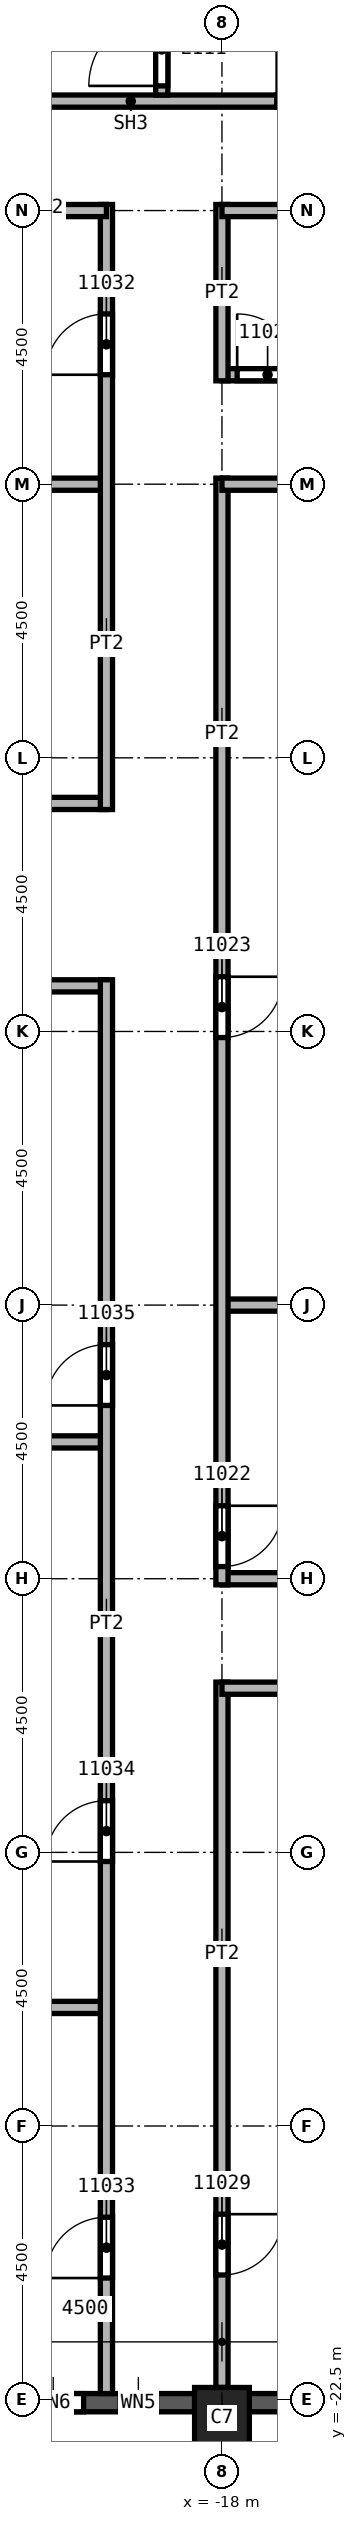
"""IFC4 building model, lengths in metres.
Left out: names, types, materials, properties, quantities, classifications, styles, units other than length and angle.
Written with IfcOpenShell. Run it as: python <this file> out.ifc"""

import sys

from ifc_helpers import new_model, si_unit, direction, frame, frame_2d, origin, origin_2d, place, context, subcontext, project, spatial, rectangle, extrude, element, fill, save


model = new_model("IFC4")
c1 = context("Model", 3, precision=1e-05, world=origin(), true_north=direction((0.0, 1.0)))
c2 = subcontext(c1, "Body", "Model", "MODEL_VIEW")
j1 = project(units=[si_unit("LENGTHUNIT", "METRE"), si_unit("PLANEANGLEUNIT", "RADIAN")], contexts=[c1])
p1 = place(None, origin())
s1 = spatial("IfcSite", under=j1, at=p1, CompositionType="ELEMENT")
p2 = place(p1, origin())
s2 = spatial("IfcBuilding", under=s1, at=p2, CompositionType="ELEMENT")
p3 = place(p2, frame((0.0, 0.0, 188.0)))
s3 = spatial("IfcBuildingStorey", under=s2, at=p3, CompositionType="ELEMENT", Elevation=188.0)
p4 = place(p3, frame((-18.0, -22.8, 0.0), z_axis=(0.0, 0.0, 1.0), x_axis=(1.0, 0.0, 0.0)))
e1 = element("IfcColumn", 1, at=p4, inside=s3, PredefinedType="COLUMN", context=c2, shape_type="SweptSolid", body=[
    extrude(rectangle(XDim=0.9, YDim=1.0, at=origin_2d()), origin(), (0.0, 0.0, 1.0), 3.72),
])
p5 = place(p3, frame((-22.05, -22.55, 0.0), z_axis=(0.0, 0.0, 1.0), x_axis=(1.0, 0.0, 0.0)))
e2 = element("IfcWall", 2, at=p5, inside=s3, PredefinedType="SOLIDWALL", context=c2, shape_type="SweptSolid", body=[
    extrude(rectangle(XDim=3.6, YDim=0.3, at=frame_2d((1.8, 0.0))), origin(), (0.0, 0.0, 1.0), 3.12),
])
p6 = place(p5, frame((0.775, 0.0, 0.8)))
e3 = element("IfcOpeningElement", 3, at=p6, cuts=e2, PredefinedType="OPENING", context=c2, shape_type="SweptSolid", body=[
    extrude(rectangle(XDim=1.0, YDim=1.95, at=frame_2d((0.5, 0.975))), frame((0.0, 0.15, 0.0), z_axis=(0.0, -1.0, 0.0), x_axis=(1.0, 0.0, 0.0)), (0.0, 0.0, 1.0), 0.3),
])
p7 = place(p5, frame((2.375, 0.0, 0.8)))
e4 = element("IfcOpeningElement", 4, at=p7, cuts=e2, PredefinedType="OPENING", context=c2, shape_type="SweptSolid", body=[
    extrude(rectangle(XDim=0.6, YDim=1.95, at=frame_2d((0.3, 0.975))), frame((0.0, 0.15, 0.0), z_axis=(0.0, -1.0, 0.0), x_axis=(1.0, 0.0, 0.0)), (0.0, 0.0, 1.0), 0.3),
])
p8 = place(p3, frame((-17.55, -22.55, 0.0), z_axis=(0.0, 0.0, 1.0), x_axis=(1.0, 0.0, 0.0)))
e5 = element("IfcWall", 5, at=p8, inside=s3, PredefinedType="SOLIDWALL", context=c2, shape_type="SweptSolid", body=[
    extrude(rectangle(XDim=3.6, YDim=0.3, at=frame_2d((1.8, 0.0))), origin(), (0.0, 0.0, 1.0), 3.12),
])
p9 = place(p8, frame((0.6, 0.0, 0.8)))
e6 = element("IfcOpeningElement", 6, at=p9, cuts=e5, PredefinedType="OPENING", context=c2, shape_type="SweptSolid", body=[
    extrude(rectangle(XDim=2.4, YDim=1.95, at=frame_2d((1.2, 0.975))), frame((0.0, 0.15, 0.0), z_axis=(0.0, -1.0, 0.0), x_axis=(1.0, 0.0, 0.0)), (0.0, 0.0, 1.0), 0.3),
])
p10 = place(p3, frame((-33.85, 3.75, 0.0), z_axis=(0.0, 0.0, 1.0), x_axis=(1.0, 0.0, 0.0)))
e7 = element("IfcWall", 7, at=p10, inside=s3, PredefinedType="PARTITIONING", context=c2, shape_type="SweptSolid", body=[
    extrude(rectangle(XDim=13.95, YDim=0.2, at=frame_2d((6.975, 0.0))), origin(), (0.0, 0.0, 1.0), 3.72),
])
p11 = place(p10, frame((10.75, 0.0, 0.0)))
e8 = element("IfcOpeningElement", 8, at=p11, cuts=e7, PredefinedType="OPENING", context=c2, shape_type="SweptSolid", body=[
    extrude(rectangle(XDim=1.0, YDim=2.1, at=frame_2d((0.5, 1.05))), frame((0.0, 0.1, 0.0), z_axis=(0.0, -1.0, 0.0), x_axis=(1.0, 0.0, 0.0)), (0.0, 0.0, 1.0), 0.2),
])
p12 = place(p10, frame((5.65, 0.0, 0.0)))
e9 = element("IfcOpeningElement", 9, at=p12, cuts=e7, PredefinedType="OPENING", context=c2, shape_type="SweptSolid", body=[
    extrude(rectangle(XDim=1.0, YDim=2.1, at=frame_2d((0.5, 1.05))), frame((0.0, 0.1, 0.0), z_axis=(0.0, -1.0, 0.0), x_axis=(1.0, 0.0, 0.0)), (0.0, 0.0, 1.0), 0.2),
])
p13 = place(p3, frame((-27.1, 9.0, 0.0), z_axis=(0.0, 0.0, 1.0), x_axis=(1.0, 0.0, 0.0)))
e10 = element("IfcWall", 10, at=p13, inside=s3, PredefinedType="PARTITIONING", context=c2, shape_type="SweptSolid", body=[
    extrude(rectangle(XDim=7.2, YDim=0.2, at=frame_2d((3.6, 0.0))), origin(), (0.0, 0.0, 1.0), 3.72),
])
p14 = place(p3, frame((-19.9, 0.75, 0.0), z_axis=(0.0, 0.0, 1.0), x_axis=(-1.0, 0.0, 0.0)))
e11 = element("IfcWall", 11, at=p14, inside=s3, PredefinedType="PARTITIONING", context=c2, shape_type="SweptSolid", body=[
    extrude(rectangle(XDim=13.95, YDim=0.2, at=frame_2d((6.975, 0.0))), origin(), (0.0, 0.0, 1.0), 3.72),
])
p15 = place(p3, frame((-24.5, -16.05, 0.0), z_axis=(0.0, 0.0, 1.0), x_axis=(1.0, 0.0, 0.0)))
e12 = element("IfcWall", 12, at=p15, inside=s3, PredefinedType="PARTITIONING", context=c2, shape_type="SweptSolid", body=[
    extrude(rectangle(XDim=4.6, YDim=0.2, at=frame_2d((2.3, 0.0))), origin(), (0.0, 0.0, 1.0), 3.72),
])
p16 = place(p3, frame((-27.1, -6.75, 0.0), z_axis=(0.0, 0.0, 1.0), x_axis=(1.0, 0.0, 0.0)))
e13 = element("IfcWall", 13, at=p16, inside=s3, PredefinedType="PARTITIONING", context=c2, shape_type="SweptSolid", body=[
    extrude(rectangle(XDim=7.2, YDim=0.2, at=frame_2d((3.6, 0.0))), origin(), (0.0, 0.0, 1.0), 3.72),
])
p17 = place(p3, frame((-19.9, -22.4, 0.0), z_axis=(0.0, 0.0, 1.0), x_axis=(0.0, 1.0, 0.0)))
e14 = element("IfcWall", 14, at=p17, inside=s3, PredefinedType="PARTITIONING", context=c2, shape_type="SweptSolid", body=[
    extrude(rectangle(XDim=23.25, YDim=0.2, at=frame_2d((11.625, 0.0))), origin(), (0.0, 0.0, 1.0), 3.72),
])
p18 = place(p17, frame((1.9, 0.0, 0.0)))
e15 = element("IfcOpeningElement", 15, at=p18, cuts=e14, PredefinedType="OPENING", context=c2, shape_type="SweptSolid", body=[
    extrude(rectangle(XDim=1.0, YDim=2.1, at=frame_2d((0.5, 1.05))), frame((0.0, 0.1, 0.0), z_axis=(0.0, -1.0, 0.0), x_axis=(1.0, 0.0, 0.0)), (0.0, 0.0, 1.0), 0.2),
])
p19 = place(p17, frame((8.75, 0.0, 0.0)))
e16 = element("IfcOpeningElement", 16, at=p19, cuts=e14, PredefinedType="OPENING", context=c2, shape_type="SweptSolid", body=[
    extrude(rectangle(XDim=1.0, YDim=2.1, at=frame_2d((0.5, 1.05))), frame((0.0, 0.1, 0.0), z_axis=(0.0, -1.0, 0.0), x_axis=(1.0, 0.0, 0.0)), (0.0, 0.0, 1.0), 0.2),
])
p20 = place(p17, frame((16.25, 0.0, 0.0)))
e17 = element("IfcOpeningElement", 17, at=p20, cuts=e14, PredefinedType="OPENING", context=c2, shape_type="SweptSolid", body=[
    extrude(rectangle(XDim=1.0, YDim=2.1, at=frame_2d((0.5, 1.05))), frame((0.0, 0.1, 0.0), z_axis=(0.0, -1.0, 0.0), x_axis=(1.0, 0.0, 0.0)), (0.0, 0.0, 1.0), 0.2),
])
p21 = place(p3, frame((-19.9, 3.65, 0.0), z_axis=(0.0, 0.0, 1.0), x_axis=(0.0, 1.0, 0.0)))
e18 = element("IfcWall", 18, at=p21, inside=s3, PredefinedType="PARTITIONING", context=c2, shape_type="SweptSolid", body=[
    extrude(rectangle(XDim=9.95, YDim=0.2, at=frame_2d((4.975, 0.0))), origin(), (0.0, 0.0, 1.0), 3.72),
])
p22 = place(p21, frame((7.15, 0.0, 0.0)))
e19 = element("IfcOpeningElement", 19, at=p22, cuts=e18, PredefinedType="OPENING", context=c2, shape_type="SweptSolid", body=[
    extrude(rectangle(XDim=1.0, YDim=2.1, at=frame_2d((0.5, 1.05))), frame((0.0, 0.1, 0.0), z_axis=(0.0, -1.0, 0.0), x_axis=(1.0, 0.0, 0.0)), (0.0, 0.0, 1.0), 0.2),
])
p23 = place(p3, frame((-19.9, 13.5, 0.0), z_axis=(0.0, 0.0, 1.0), x_axis=(-1.0, 0.0, 0.0)))
e20 = element("IfcWall", 20, at=p23, inside=s3, PredefinedType="PARTITIONING", context=c2, shape_type="SweptSolid", body=[
    extrude(rectangle(XDim=2.1, YDim=0.2, at=frame_2d((1.05, 0.0))), origin(), (0.0, 0.0, 1.0), 3.72),
])
p24 = place(p3, frame((-18.0, -10.7, 0.0), z_axis=(0.0, 0.0, 1.0), x_axis=(0.0, -1.0, 0.0)))
e21 = element("IfcWall", 21, at=p24, inside=s3, PredefinedType="PARTITIONING", context=c2, shape_type="SweptSolid", body=[
    extrude(rectangle(XDim=11.6, YDim=0.2, at=frame_2d((5.8, 0.0))), origin(), (0.0, 0.0, 1.0), 3.72),
])
p25 = place(p24, frame((8.75, 0.0, 0.0)))
e22 = element("IfcOpeningElement", 22, at=p25, cuts=e21, PredefinedType="OPENING", context=c2, shape_type="SweptSolid", body=[
    extrude(rectangle(XDim=1.0, YDim=2.1, at=frame_2d((0.5, 1.05))), frame((0.0, 0.1, 0.0), z_axis=(0.0, -1.0, 0.0), x_axis=(1.0, 0.0, 0.0)), (0.0, 0.0, 1.0), 0.2),
])
for number, where, z_axis, x_axis in (
    (23, (-18.0, -9.0, 0.0), (0.0, 0.0, 1.0), (1.0, 0.0, 0.0)),
    (24, (-18.0, -4.5, 0.0), (0.0, 0.0, 1.0), (1.0, 0.0, 0.0)),
):
    element("IfcWall", number, at=place(p3, frame(where, z_axis=z_axis, x_axis=x_axis)), inside=s3, PredefinedType="PARTITIONING", context=c2, shape_type="SweptSolid", body=[
        extrude(rectangle(XDim=4.5, YDim=0.2, at=frame_2d((2.25, 0.0))), origin(), (0.0, 0.0, 1.0), 3.72),
    ])
p26 = place(p3, frame((-18.0, 9.1, 0.0), z_axis=(0.0, 0.0, 1.0), x_axis=(0.0, -1.0, 0.0)))
e25 = element("IfcWall", 25, at=p26, inside=s3, PredefinedType="PARTITIONING", context=c2, shape_type="SweptSolid", body=[
    extrude(rectangle(XDim=18.2, YDim=0.2, at=frame_2d((9.1, 0.0))), origin(), (0.0, 0.0, 1.0), 3.72),
])
p27 = place(p26, frame((16.9, 0.0, 0.0)))
e26 = element("IfcOpeningElement", 26, at=p27, cuts=e25, PredefinedType="OPENING", context=c2, shape_type="SweptSolid", body=[
    extrude(rectangle(XDim=1.0, YDim=2.1, at=frame_2d((0.5, 1.05))), frame((0.0, 0.1, 0.0), z_axis=(0.0, -1.0, 0.0), x_axis=(1.0, 0.0, 0.0)), (0.0, 0.0, 1.0), 0.2),
])
p28 = place(p26, frame((8.2, 0.0, 0.0)))
e27 = element("IfcOpeningElement", 27, at=p28, cuts=e25, PredefinedType="OPENING", context=c2, shape_type="SweptSolid", body=[
    extrude(rectangle(XDim=1.0, YDim=2.1, at=frame_2d((0.5, 1.05))), frame((0.0, 0.1, 0.0), z_axis=(0.0, -1.0, 0.0), x_axis=(1.0, 0.0, 0.0)), (0.0, 0.0, 1.0), 0.2),
])
p29 = place(p3, frame((-18.0, 10.8, 0.0), z_axis=(0.0, 0.0, 1.0), x_axis=(1.0, 0.0, 0.0)))
e28 = element("IfcWall", 28, at=p29, inside=s3, PredefinedType="PARTITIONING", context=c2, shape_type="SweptSolid", body=[
    extrude(rectangle(XDim=3.6, YDim=0.2, at=frame_2d((1.8, 0.0))), origin(), (0.0, 0.0, 1.0), 3.72),
])
p30 = place(p29, frame((0.25, 0.0, 0.0)))
e29 = element("IfcOpeningElement", 29, at=p30, cuts=e28, PredefinedType="OPENING", context=c2, shape_type="SweptSolid", body=[
    extrude(rectangle(XDim=1.0, YDim=2.1, at=frame_2d((0.5, 1.05))), frame((0.0, 0.1, 0.0), z_axis=(0.0, -1.0, 0.0), x_axis=(1.0, 0.0, 0.0)), (0.0, 0.0, 1.0), 0.2),
])
p31 = place(p3, frame((-18.0, 13.6, 0.0), z_axis=(0.0, 0.0, 1.0), x_axis=(0.0, -1.0, 0.0)))
e30 = element("IfcWall", 30, at=p31, inside=s3, PredefinedType="PARTITIONING", context=c2, shape_type="SweptSolid", body=[
    extrude(rectangle(XDim=2.9, YDim=0.2, at=frame_2d((1.45, 0.0))), origin(), (0.0, 0.0, 1.0), 3.72),
])
p32 = place(p3, frame((-15.3, 13.5, 0.0), z_axis=(0.0, 0.0, 1.0), x_axis=(-1.0, 0.0, 0.0)))
e31 = element("IfcWall", 31, at=p32, inside=s3, PredefinedType="PARTITIONING", context=c2, shape_type="SweptSolid", body=[
    extrude(rectangle(XDim=2.7, YDim=0.2, at=frame_2d((1.35, 0.0))), origin(), (0.0, 0.0, 1.0), 3.72),
])
p33 = place(p3, frame((-14.4, -10.8, 0.0), z_axis=(0.0, 0.0, 1.0), x_axis=(-1.0, 0.0, 0.0)))
e32 = element("IfcWall", 32, at=p33, inside=s3, PredefinedType="PARTITIONING", context=c2, shape_type="SweptSolid", body=[
    extrude(rectangle(XDim=3.6, YDim=0.2, at=frame_2d((1.8, 0.0))), origin(), (0.0, 0.0, 1.0), 3.72),
])
p34 = place(p3, frame((-13.5, 9.0, 0.0), z_axis=(0.0, 0.0, 1.0), x_axis=(-1.0, 0.0, 0.0)))
e33 = element("IfcWall", 33, at=p34, inside=s3, PredefinedType="PARTITIONING", context=c2, shape_type="SweptSolid", body=[
    extrude(rectangle(XDim=4.5, YDim=0.2, at=frame_2d((2.25, 0.0))), origin(), (0.0, 0.0, 1.0), 3.72),
])
p35 = place(p3, frame((-21.9, 15.3, 0.0), z_axis=(0.0, 0.0, 1.0), x_axis=(1.0, 0.0, 0.0)))
e34 = element("IfcWall", 34, at=p35, inside=s3, PredefinedType="SOLIDWALL", context=c2, shape_type="SweptSolid", body=[
    extrude(rectangle(XDim=8.275, YDim=0.2, at=frame_2d((4.137, 0.0))), origin(), (0.0, 0.0, 1.0), 3.72),
])
p36 = place(p35, frame((4.8, 0.0, 0.0)))
e35 = element("IfcOpeningElement", 35, at=p36, cuts=e34, PredefinedType="OPENING", context=c2, shape_type="SweptSolid", body=[
    extrude(rectangle(XDim=1.2, YDim=2.1, at=frame_2d((0.6, 1.05))), frame((0.0, 0.1, 0.0), z_axis=(0.0, -1.0, 0.0), x_axis=(1.0, 0.0, 0.0)), (0.0, 0.0, 1.0), 0.2),
])
p37 = place(p3, frame((-18.99, 15.4, 0.0), z_axis=(0.0, 0.0, 1.0), x_axis=(0.0, 1.0, 0.0)))
e36 = element("IfcWall", 36, at=p37, inside=s3, PredefinedType="SOLIDWALL", context=c2, shape_type="SweptSolid", body=[
    extrude(rectangle(XDim=5.9, YDim=0.2, at=frame_2d((2.95, 0.0))), origin(), (0.0, 0.0, 1.0), 3.72),
])
p38 = place(p37, frame((0.15, 0.0, 0.0)))
e37 = element("IfcOpeningElement", 37, at=p38, cuts=e36, PredefinedType="OPENING", context=c2, shape_type="SweptSolid", body=[
    extrude(rectangle(XDim=1.2, YDim=2.1, at=frame_2d((0.6, 1.05))), frame((0.0, 0.1, 0.0), z_axis=(0.0, -1.0, 0.0), x_axis=(1.0, 0.0, 0.0)), (0.0, 0.0, 1.0), 0.2),
])
p39 = place(p27, origin())
e38 = element("IfcDoor", 38, at=p39, inside=s3, OperationType="SINGLE_SWING_LEFT", PredefinedType="DOOR", context=c2, shape_type="SweptSolid", body=[
    extrude(rectangle(XDim=1.0, YDim=2.1, at=frame_2d((0.5, 1.05))), frame((0.0, 0.025, 0.0), z_axis=(0.0, -1.0, 0.0), x_axis=(1.0, 0.0, 0.0)), (0.0, 0.0, 1.0), 0.05),
])
fill(e26, e38)
p40 = place(p28, origin())
e39 = element("IfcDoor", 39, at=p40, inside=s3, OperationType="SINGLE_SWING_RIGHT", PredefinedType="DOOR", context=c2, shape_type="SweptSolid", body=[
    extrude(rectangle(XDim=1.0, YDim=2.1, at=frame_2d((0.5, 1.05))), frame((0.0, 0.025, 0.0), z_axis=(0.0, -1.0, 0.0), x_axis=(1.0, 0.0, 0.0)), (0.0, 0.0, 1.0), 0.05),
])
fill(e27, e39)
p41 = place(p30, origin())
e40 = element("IfcDoor", 40, at=p41, inside=s3, OperationType="SINGLE_SWING_RIGHT", PredefinedType="DOOR", context=c2, shape_type="SweptSolid", body=[
    extrude(rectangle(XDim=1.0, YDim=2.1, at=frame_2d((0.5, 1.05))), frame((0.0, 0.025, 0.0), z_axis=(0.0, -1.0, 0.0), x_axis=(1.0, 0.0, 0.0)), (0.0, 0.0, 1.0), 0.05),
])
fill(e29, e40)
p42 = place(p25, origin())
e41 = element("IfcDoor", 41, at=p42, inside=s3, OperationType="SINGLE_SWING_RIGHT", PredefinedType="DOOR", context=c2, shape_type="SweptSolid", body=[
    extrude(rectangle(XDim=1.0, YDim=2.1, at=frame_2d((0.5, 1.05))), frame((0.0, 0.025, 0.0), z_axis=(0.0, -1.0, 0.0), x_axis=(1.0, 0.0, 0.0)), (0.0, 0.0, 1.0), 0.05),
])
fill(e22, e41)
p43 = place(p22, origin())
e42 = element("IfcDoor", 42, at=p43, inside=s3, OperationType="SINGLE_SWING_LEFT", PredefinedType="DOOR", context=c2, shape_type="SweptSolid", body=[
    extrude(rectangle(XDim=1.0, YDim=2.1, at=frame_2d((0.5, 1.05))), frame((0.0, 0.025, 0.0), z_axis=(0.0, -1.0, 0.0), x_axis=(1.0, 0.0, 0.0)), (0.0, 0.0, 1.0), 0.05),
])
fill(e19, e42)
p44 = place(p18, origin())
e43 = element("IfcDoor", 43, at=p44, inside=s3, OperationType="SINGLE_SWING_RIGHT", PredefinedType="DOOR", context=c2, shape_type="SweptSolid", body=[
    extrude(rectangle(XDim=1.0, YDim=2.1, at=frame_2d((0.5, 1.05))), frame((0.0, 0.025, 0.0), z_axis=(0.0, -1.0, 0.0), x_axis=(1.0, 0.0, 0.0)), (0.0, 0.0, 1.0), 0.05),
])
fill(e15, e43)
p45 = place(p19, origin())
e44 = element("IfcDoor", 44, at=p45, inside=s3, OperationType="SINGLE_SWING_LEFT", PredefinedType="DOOR", context=c2, shape_type="SweptSolid", body=[
    extrude(rectangle(XDim=1.0, YDim=2.1, at=frame_2d((0.5, 1.05))), frame((0.0, 0.025, 0.0), z_axis=(0.0, -1.0, 0.0), x_axis=(1.0, 0.0, 0.0)), (0.0, 0.0, 1.0), 0.05),
])
fill(e16, e44)
p46 = place(p20, origin())
e45 = element("IfcDoor", 45, at=p46, inside=s3, OperationType="SINGLE_SWING_RIGHT", PredefinedType="DOOR", context=c2, shape_type="SweptSolid", body=[
    extrude(rectangle(XDim=1.0, YDim=2.1, at=frame_2d((0.5, 1.05))), frame((0.0, 0.025, 0.0), z_axis=(0.0, -1.0, 0.0), x_axis=(1.0, 0.0, 0.0)), (0.0, 0.0, 1.0), 0.05),
])
fill(e17, e45)
p47 = place(p38, origin())
e46 = element("IfcDoor", 46, at=p47, inside=s3, OperationType="SINGLE_SWING_LEFT", PredefinedType="DOOR", context=c2, shape_type="SweptSolid", body=[
    extrude(rectangle(XDim=1.2, YDim=2.1, at=frame_2d((0.6, 1.05))), frame((0.0, 0.025, 0.0), z_axis=(0.0, -1.0, 0.0), x_axis=(1.0, 0.0, 0.0)), (0.0, 0.0, 1.0), 0.05),
])
fill(e37, e46)
p48 = place(p6, origin())
e47 = element("IfcWindow", 47, at=p48, inside=s3, PartitioningType="SINGLE_PANEL", PredefinedType="WINDOW", context=c2, shape_type="SweptSolid", body=[
    extrude(rectangle(XDim=1.0, YDim=1.95, at=frame_2d((0.5, 0.975))), frame((0.0, 0.03, 0.0), z_axis=(0.0, -1.0, 0.0), x_axis=(1.0, 0.0, 0.0)), (0.0, 0.0, 1.0), 0.06),
])
fill(e3, e47)
p49 = place(p7, origin())
e48 = element("IfcWindow", 48, at=p49, inside=s3, PartitioningType="SINGLE_PANEL", PredefinedType="WINDOW", context=c2, shape_type="SweptSolid", body=[
    extrude(rectangle(XDim=0.6, YDim=1.95, at=frame_2d((0.3, 0.975))), frame((0.0, 0.03, 0.0), z_axis=(0.0, -1.0, 0.0), x_axis=(1.0, 0.0, 0.0)), (0.0, 0.0, 1.0), 0.06),
])
fill(e4, e48)
save(model, sys.argv[1])
